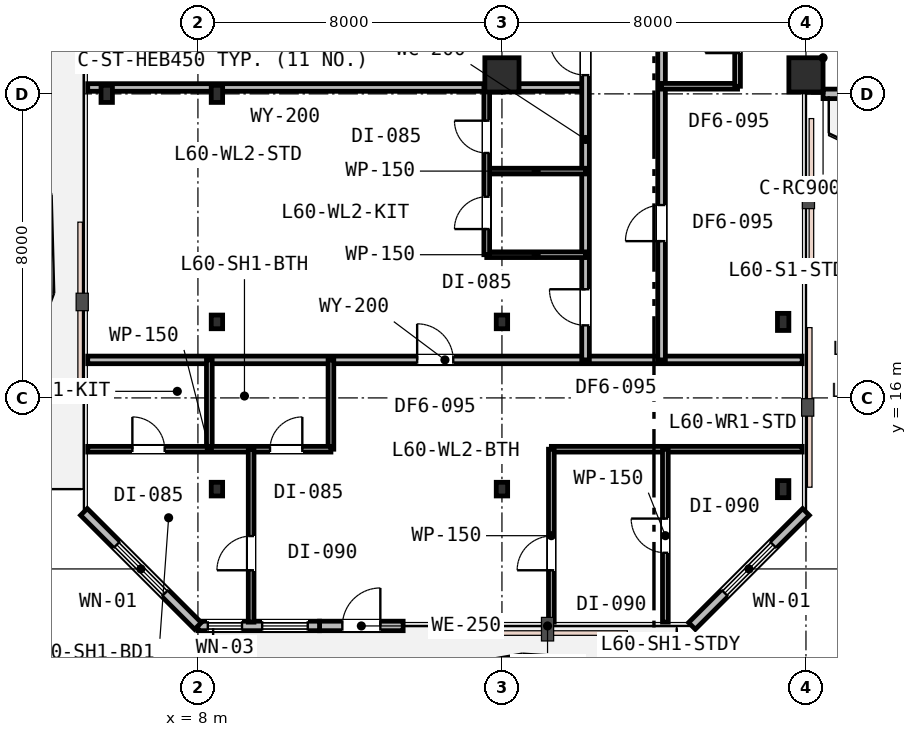
"""IFC4 building model, lengths in metres.
Left out: names, types, materials, properties, quantities, classifications, styles, units other than length and angle.
Written with IfcOpenShell. Run it as: python <this file> out.ifc"""

import sys

from ifc_helpers import new_model, si_unit, direction, frame, frame_2d, origin, origin_2d, place, context, subcontext, project, spatial, rectangle, i_section, extrude, element, fill, save


model = new_model("IFC4")
c1 = context("Model", 3, precision=1e-05, world=origin(), true_north=direction((0.0, 1.0)))
c2 = subcontext(c1, "Body", "Model", "MODEL_VIEW")
j1 = project(units=[si_unit("LENGTHUNIT", "METRE"), si_unit("PLANEANGLEUNIT", "RADIAN")], contexts=[c1])
p1 = place(None, origin())
s1 = spatial("IfcSite", under=j1, at=p1, CompositionType="ELEMENT")
p2 = place(p1, origin())
s2 = spatial("IfcBuilding", under=s1, at=p2, CompositionType="ELEMENT")
p3 = place(p2, frame((0.0, 0.0, 233.6)))
s3 = spatial("IfcBuildingStorey", under=s2, at=p3, CompositionType="ELEMENT", Elevation=233.6)
p4 = place(p3, frame((8.5, 24.0, 0.0), z_axis=(0.0, 0.0, 1.0), x_axis=(1.0, 0.0, 0.0)))
e1 = element("IfcColumn", 1, at=p4, inside=s3, PredefinedType="COLUMN", context=c2, shape_type="SweptSolid", body=[
    extrude(i_section(OverallWidth=0.3, OverallDepth=0.45, WebThickness=0.014, FlangeThickness=0.026, FilletRadius=0.027, at=origin_2d()), origin(), (0.0, 0.0, 1.0), 3.8),
])
for number, where, z_axis, x_axis in (
    (2, (16.0, 24.5, 0.0), (0.0, 0.0, 1.0), (1.0, 0.0, 0.0)),
    (3, (24.0, 24.5, 0.0), (0.0, 0.0, 1.0), (1.0, 0.0, 0.0)),
):
    element("IfcColumn", number, at=place(p3, frame(where, z_axis=z_axis, x_axis=x_axis)), inside=s3, PredefinedType="COLUMN", context=c2, shape_type="SweptSolid", body=[
        extrude(rectangle(XDim=0.9, YDim=0.9, at=origin_2d()), origin(), (0.0, 0.0, 1.0), 3.8),
    ])
for number, where, z_axis, x_axis in (
    (4, (5.6, 24.0, 0.0), (0.0, 0.0, 1.0), (1.0, 0.0, 0.0)),
    (5, (23.4, 13.6, 0.0), (0.0, 0.0, 1.0), (1.0, 0.0, 0.0)),
    (6, (23.4, 18.0, 0.0), (0.0, 0.0, 1.0), (1.0, 0.0, 0.0)),
):
    element("IfcColumn", number, at=place(p3, frame(where, z_axis=z_axis, x_axis=x_axis)), inside=s3, PredefinedType="COLUMN", context=c2, shape_type="SweptSolid", body=[
        extrude(i_section(OverallWidth=0.3, OverallDepth=0.45, WebThickness=0.014, FlangeThickness=0.026, FilletRadius=0.027, at=origin_2d()), origin(), (0.0, 0.0, 1.0), 3.8),
    ])
for number, where, z_axis, x_axis in (
    (7, (8.5, 13.6, 0.0), (0.0, 0.0, 1.0), (1.0, 0.0, 0.0)),
    (8, (16.0, 13.6, 0.0), (0.0, 0.0, 1.0), (1.0, 0.0, 0.0)),
    (9, (8.5, 18.0, 0.0), (0.0, 0.0, 1.0), (1.0, 0.0, 0.0)),
    (10, (16.0, 18.0, 0.0), (0.0, 0.0, 1.0), (1.0, 0.0, 0.0)),
):
    element("IfcColumn", number, at=place(p3, frame(where, z_axis=z_axis, x_axis=x_axis)), inside=s3, PredefinedType="COLUMN", context=c2, shape_type="SweptSolid", body=[
        extrude(i_section(OverallWidth=0.3, OverallDepth=0.36, WebThickness=0.013, FlangeThickness=0.022, FilletRadius=0.027, at=origin_2d()), origin(), (0.0, 0.0, 1.0), 3.8),
    ])
p5 = place(p3, frame((11.2, 10.0, 0.0), z_axis=(0.0, 0.0, 1.0), x_axis=(1.0, 0.0, 0.0)))
e11 = element("IfcWall", 11, at=p5, inside=s3, PredefinedType="STANDARD", context=c2, shape_type="SweptSolid", body=[
    extrude(rectangle(XDim=2.2, YDim=0.25, at=frame_2d((1.1, 0.0))), origin(), (0.0, 0.0, 1.0), 3.53),
])
p6 = place(p5, frame((0.6, 0.0, 0.0)))
e12 = element("IfcOpeningElement", 12, at=p6, cuts=e11, PredefinedType="OPENING", context=c2, shape_type="SweptSolid", body=[
    extrude(rectangle(XDim=1.0, YDim=2.15, at=frame_2d((0.5, 1.075))), frame((0.0, 0.135, 0.0), z_axis=(0.0, -1.0, 0.0), x_axis=(1.0, 0.0, 0.0)), (0.0, 0.0, 1.0), 0.27),
])
p7 = place(p3, frame((8.0, 10.0, 0.0), z_axis=(0.0, 0.0, 1.0), x_axis=(1.0, 0.0, 0.0)))
e13 = element("IfcWall", 13, at=p7, inside=s3, PredefinedType="STANDARD", context=c2, shape_type="SweptSolid", body=[
    extrude(rectangle(XDim=3.2, YDim=0.25, at=frame_2d((1.6, 0.0))), origin(), (0.0, 0.0, 1.0), 3.53),
])
p8 = place(p7, frame((0.26, 0.0, 0.9)))
e14 = element("IfcOpeningElement", 14, at=p8, cuts=e13, PredefinedType="OPENING", context=c2, shape_type="SweptSolid", body=[
    extrude(rectangle(XDim=0.9, YDim=1.55, at=frame_2d((0.45, 0.775))), frame((0.0, 0.135, 0.0), z_axis=(0.0, -1.0, 0.0), x_axis=(1.0, 0.0, 0.0)), (0.0, 0.0, 1.0), 0.27),
])
p9 = place(p7, frame((1.69, 0.0, 0.85)))
e15 = element("IfcOpeningElement", 15, at=p9, cuts=e13, PredefinedType="OPENING", context=c2, shape_type="SweptSolid", body=[
    extrude(rectangle(XDim=1.2, YDim=1.6, at=frame_2d((0.6, 0.8))), frame((0.0, 0.135, 0.0), z_axis=(0.0, -1.0, 0.0), x_axis=(1.0, 0.0, 0.0)), (0.0, 0.0, 1.0), 0.27),
])
p10 = place(p3, frame((21.0, 10.0, 0.0), z_axis=(0.0, 0.0, 1.0), x_axis=(0.707106781187, 0.707106781187, 0.0)))
e16 = element("IfcWall", 16, at=p10, inside=s3, PredefinedType="STANDARD", context=c2, shape_type="SweptSolid", body=[
    extrude(rectangle(XDim=4.243, YDim=0.25, at=frame_2d((2.121, 0.0))), origin(), (0.0, 0.0, 1.0), 3.53),
])
p11 = place(p10, frame((1.221, 0.0, 0.75)))
e17 = element("IfcOpeningElement", 17, at=p11, cuts=e16, PredefinedType="OPENING", context=c2, shape_type="SweptSolid", body=[
    extrude(rectangle(XDim=1.8, YDim=1.85, at=frame_2d((0.9, 0.925))), frame((0.0, 0.135, 0.0), z_axis=(0.0, -1.0, 0.0), x_axis=(1.0, 0.0, 0.0)), (0.0, 0.0, 1.0), 0.27),
])
p12 = place(p3, frame((24.45, 24.0, 0.0), z_axis=(0.0, 0.0, 1.0), x_axis=(1.0, 0.0, 0.0)))
e18 = element("IfcWall", 18, at=p12, inside=s3, PredefinedType="STANDARD", context=c2, shape_type="SweptSolid", body=[
    extrude(rectangle(XDim=0.95, YDim=0.25, at=frame_2d((0.475, 0.0))), origin(), (0.0, 0.0, 1.0), 3.24),
])
p13 = place(p3, frame((5.0, 13.0, 0.0), z_axis=(0.0, 0.0, 1.0), x_axis=(0.707106781187, -0.707106781187, 0.0)))
e19 = element("IfcWall", 19, at=p13, inside=s3, PredefinedType="STANDARD", context=c2, shape_type="SweptSolid", body=[
    extrude(rectangle(XDim=4.243, YDim=0.25, at=frame_2d((2.121, 0.0))), origin(), (0.0, 0.0, 1.0), 3.53),
])
p14 = place(p13, frame((1.221, 0.0, 0.75)))
e20 = element("IfcOpeningElement", 20, at=p14, cuts=e19, PredefinedType="OPENING", context=c2, shape_type="SweptSolid", body=[
    extrude(rectangle(XDim=1.8, YDim=1.85, at=frame_2d((0.9, 0.925))), frame((0.0, 0.135, 0.0), z_axis=(0.0, -1.0, 0.0), x_axis=(1.0, 0.0, 0.0)), (0.0, 0.0, 1.0), 0.27),
])
p15 = place(p3, frame((5.1, 17.0, 0.0), z_axis=(0.0, 0.0, 1.0), x_axis=(1.0, 0.0, 0.0)))
e21 = element("IfcWall", 21, at=p15, inside=s3, PredefinedType="PARTITIONING", context=c2, shape_type="SweptSolid", body=[
    extrude(rectangle(XDim=18.8, YDim=0.2, at=frame_2d((9.4, 0.0))), origin(), (0.0, 0.0, 1.0), 2.92),
])
p16 = place(p15, frame((8.668, 0.0, 0.0)))
e22 = element("IfcOpeningElement", 22, at=p16, cuts=e21, PredefinedType="OPENING", context=c2, shape_type="SweptSolid", body=[
    extrude(rectangle(XDim=0.95, YDim=2.15, at=frame_2d((0.475, 1.075))), frame((0.0, 0.11, 0.0), z_axis=(0.0, -1.0, 0.0), x_axis=(1.0, 0.0, 0.0)), (0.0, 0.0, 1.0), 0.22),
])
p17 = place(p3, frame((5.1, 24.168, 0.0), z_axis=(0.0, 0.0, 1.0), x_axis=(1.0, 0.0, 0.0)))
e23 = element("IfcWall", 23, at=p17, inside=s3, PredefinedType="PARTITIONING", context=c2, shape_type="SweptSolid", body=[
    extrude(rectangle(XDim=13.1, YDim=0.2, at=frame_2d((6.55, 0.0))), origin(), (0.0, 0.0, 1.0), 2.92),
])
p18 = place(p3, frame((18.2, 17.0, 0.0), z_axis=(0.0, 0.0, 1.0), x_axis=(0.0, 1.0, 0.0)))
e24 = element("IfcWall", 24, at=p18, inside=s3, PredefinedType="PARTITIONING", context=c2, shape_type="SweptSolid", body=[
    extrude(rectangle(XDim=11.6, YDim=0.2, at=frame_2d((5.8, 0.0))), origin(), (0.0, 0.0, 1.0), 2.92),
])
p19 = place(p18, frame((7.493, 0.0, 0.0)))
e25 = element("IfcOpeningElement", 25, at=p19, cuts=e24, PredefinedType="OPENING", context=c2, shape_type="SweptSolid", body=[
    extrude(rectangle(XDim=0.95, YDim=2.15, at=frame_2d((0.475, 1.075))), frame((0.0, 0.11, 0.0), z_axis=(0.0, -1.0, 0.0), x_axis=(1.0, 0.0, 0.0)), (0.0, 0.0, 1.0), 0.22),
])
p20 = place(p18, frame((0.909, 0.0, 0.0)))
e26 = element("IfcOpeningElement", 26, at=p20, cuts=e24, PredefinedType="OPENING", context=c2, shape_type="SweptSolid", body=[
    extrude(rectangle(XDim=0.95, YDim=2.15, at=frame_2d((0.475, 1.075))), frame((0.0, 0.11, 0.0), z_axis=(0.0, -1.0, 0.0), x_axis=(1.0, 0.0, 0.0)), (0.0, 0.0, 1.0), 0.22),
])
for number, where, z_axis, x_axis in (
    (27, (15.6, 19.768, 0.0), (0.0, 0.0, 1.0), (1.0, 0.0, 0.0)),
    (28, (15.6, 21.968, 0.0), (0.0, 0.0, 1.0), (1.0, 0.0, 0.0)),
):
    element("IfcWall", number, at=place(p3, frame(where, z_axis=z_axis, x_axis=x_axis)), inside=s3, PredefinedType="PARTITIONING", context=c2, shape_type="SweptSolid", body=[
        extrude(rectangle(XDim=2.6, YDim=0.15, at=frame_2d((1.3, 0.0))), origin(), (0.0, 0.0, 1.0), 2.92),
    ])
p21 = place(p3, frame((15.6, 19.768, 0.0), z_axis=(0.0, 0.0, 1.0), x_axis=(0.0, 1.0, 0.0)))
e29 = element("IfcWall", 29, at=p21, inside=s3, PredefinedType="PARTITIONING", context=c2, shape_type="SweptSolid", body=[
    extrude(rectangle(XDim=4.4, YDim=0.15, at=frame_2d((2.2, 0.0))), origin(), (0.0, 0.0, 1.0), 2.92),
])
p22 = place(p21, frame((0.675, 0.0, 0.0)))
e30 = element("IfcOpeningElement", 30, at=p22, cuts=e29, PredefinedType="OPENING", context=c2, shape_type="SweptSolid", body=[
    extrude(rectangle(XDim=0.85, YDim=2.15, at=frame_2d((0.425, 1.075))), frame((0.0, 0.085, 0.0), z_axis=(0.0, -1.0, 0.0), x_axis=(1.0, 0.0, 0.0)), (0.0, 0.0, 1.0), 0.17),
])
p23 = place(p21, frame((2.677, 0.0, 0.0)))
e31 = element("IfcOpeningElement", 31, at=p23, cuts=e29, PredefinedType="OPENING", context=c2, shape_type="SweptSolid", body=[
    extrude(rectangle(XDim=0.85, YDim=2.15, at=frame_2d((0.425, 1.075))), frame((0.0, 0.085, 0.0), z_axis=(0.0, -1.0, 0.0), x_axis=(1.0, 0.0, 0.0)), (0.0, 0.0, 1.0), 0.17),
])
p24 = place(p3, frame((20.2, 17.0, 0.0), z_axis=(0.0, 0.0, 1.0), x_axis=(0.0, 1.0, 0.0)))
e32 = element("IfcWall", 32, at=p24, inside=s3, PredefinedType="PARTITIONING", context=c2, shape_type="SweptSolid", body=[
    extrude(rectangle(XDim=11.6, YDim=0.2, at=frame_2d((5.8, 0.0))), origin(), (0.0, 0.0, 1.0), 2.92),
])
p25 = place(p24, frame((3.125, 0.0, 0.0)))
e33 = element("IfcOpeningElement", 33, at=p25, cuts=e32, PredefinedType="OPENING", context=c2, shape_type="SweptSolid", body=[
    extrude(rectangle(XDim=0.95, YDim=2.15, at=frame_2d((0.475, 1.075))), frame((0.0, 0.11, 0.0), z_axis=(0.0, -1.0, 0.0), x_axis=(1.0, 0.0, 0.0)), (0.0, 0.0, 1.0), 0.22),
])
p26 = place(p3, frame((20.2, 24.2, 0.0), z_axis=(0.0, 0.0, 1.0), x_axis=(1.0, 0.0, 0.0)))
e34 = element("IfcWall", 34, at=p26, inside=s3, PredefinedType="PARTITIONING", context=c2, shape_type="SweptSolid", body=[
    extrude(rectangle(XDim=2.0, YDim=0.15, at=frame_2d((1.0, 0.0))), origin(), (0.0, 0.0, 1.0), 2.92),
])
p27 = place(p3, frame((22.2, 24.2, 0.0), z_axis=(0.0, 0.0, 1.0), x_axis=(0.0, 1.0, 0.0)))
e35 = element("IfcWall", 35, at=p27, inside=s3, PredefinedType="PARTITIONING", context=c2, shape_type="SweptSolid", body=[
    extrude(rectangle(XDim=4.4, YDim=0.15, at=frame_2d((2.2, 0.0))), origin(), (0.0, 0.0, 1.0), 2.92),
])
p28 = place(p27, frame((0.873, 0.0, 0.0)))
e36 = element("IfcOpeningElement", 36, at=p28, cuts=e35, PredefinedType="OPENING", context=c2, shape_type="SweptSolid", body=[
    extrude(rectangle(XDim=0.85, YDim=2.15, at=frame_2d((0.425, 1.075))), frame((0.0, 0.085, 0.0), z_axis=(0.0, -1.0, 0.0), x_axis=(1.0, 0.0, 0.0)), (0.0, 0.0, 1.0), 0.17),
])
p29 = place(p27, frame((2.875, 0.0, 0.0)))
e37 = element("IfcOpeningElement", 37, at=p29, cuts=e35, PredefinedType="OPENING", context=c2, shape_type="SweptSolid", body=[
    extrude(rectangle(XDim=0.85, YDim=2.15, at=frame_2d((0.425, 1.075))), frame((0.0, 0.085, 0.0), z_axis=(0.0, -1.0, 0.0), x_axis=(1.0, 0.0, 0.0)), (0.0, 0.0, 1.0), 0.17),
])
p30 = place(p3, frame((11.5, 14.65, 0.0), z_axis=(0.0, 0.0, 1.0), x_axis=(0.0, 1.0, 0.0)))
e38 = element("IfcWall", 38, at=p30, inside=s3, PredefinedType="PARTITIONING", context=c2, shape_type="SweptSolid", body=[
    extrude(rectangle(XDim=2.35, YDim=0.15, at=frame_2d((1.175, 0.0))), origin(), (0.0, 0.0, 1.0), 3.22),
])
p31 = place(p3, frame((8.3, 14.65, 0.0), z_axis=(0.0, 0.0, 1.0), x_axis=(0.0, 1.0, 0.0)))
e39 = element("IfcWall", 39, at=p31, inside=s3, PredefinedType="PARTITIONING", context=c2, shape_type="SweptSolid", body=[
    extrude(rectangle(XDim=2.35, YDim=0.15, at=frame_2d((1.175, 0.0))), origin(), (0.0, 0.0, 1.0), 2.92),
])
p32 = place(p3, frame((5.1, 14.65, 0.0), z_axis=(0.0, 0.0, 1.0), x_axis=(1.0, 0.0, 0.0)))
e40 = element("IfcWall", 40, at=p32, inside=s3, PredefinedType="PARTITIONING", context=c2, shape_type="SweptSolid", body=[
    extrude(rectangle(XDim=6.4, YDim=0.15, at=frame_2d((3.2, 0.0))), origin(), (0.0, 0.0, 1.0), 2.92),
])
p33 = place(p32, frame((1.175, 0.0, 0.0)))
e41 = element("IfcOpeningElement", 41, at=p33, cuts=e40, PredefinedType="OPENING", context=c2, shape_type="SweptSolid", body=[
    extrude(rectangle(XDim=0.85, YDim=2.15, at=frame_2d((0.425, 1.075))), frame((0.0, 0.085, 0.0), z_axis=(0.0, -1.0, 0.0), x_axis=(1.0, 0.0, 0.0)), (0.0, 0.0, 1.0), 0.17),
])
p34 = place(p32, frame((4.797, 0.0, 0.0)))
e42 = element("IfcOpeningElement", 42, at=p34, cuts=e40, PredefinedType="OPENING", context=c2, shape_type="SweptSolid", body=[
    extrude(rectangle(XDim=0.85, YDim=2.15, at=frame_2d((0.425, 1.075))), frame((0.0, 0.085, 0.0), z_axis=(0.0, -1.0, 0.0), x_axis=(1.0, 0.0, 0.0)), (0.0, 0.0, 1.0), 0.17),
])
p35 = place(p3, frame((17.3, 14.65, 0.0), z_axis=(0.0, 0.0, 1.0), x_axis=(1.0, 0.0, 0.0)))
e43 = element("IfcWall", 43, at=p35, inside=s3, PredefinedType="PARTITIONING", context=c2, shape_type="SweptSolid", body=[
    extrude(rectangle(XDim=6.6, YDim=0.15, at=frame_2d((3.3, 0.0))), origin(), (0.0, 0.0, 1.0), 3.22),
])
p36 = place(p3, frame((9.4, 10.1, 0.0), z_axis=(0.0, 0.0, 1.0), x_axis=(0.0, 1.0, 0.0)))
e44 = element("IfcWall", 44, at=p36, inside=s3, PredefinedType="PARTITIONING", context=c2, shape_type="SweptSolid", body=[
    extrude(rectangle(XDim=4.55, YDim=0.15, at=frame_2d((2.275, 0.0))), origin(), (0.0, 0.0, 1.0), 2.92),
])
p37 = place(p36, frame((1.365, 0.0, 0.0)))
e45 = element("IfcOpeningElement", 45, at=p37, cuts=e44, PredefinedType="OPENING", context=c2, shape_type="SweptSolid", body=[
    extrude(rectangle(XDim=0.9, YDim=2.15, at=frame_2d((0.45, 1.075))), frame((0.0, 0.085, 0.0), z_axis=(0.0, -1.0, 0.0), x_axis=(1.0, 0.0, 0.0)), (0.0, 0.0, 1.0), 0.17),
])
p38 = place(p3, frame((20.3, 10.1, 0.0), z_axis=(0.0, 0.0, 1.0), x_axis=(0.0, 1.0, 0.0)))
e46 = element("IfcWall", 46, at=p38, inside=s3, PredefinedType="PARTITIONING", context=c2, shape_type="SweptSolid", body=[
    extrude(rectangle(XDim=4.55, YDim=0.15, at=frame_2d((2.275, 0.0))), origin(), (0.0, 0.0, 1.0), 2.92),
])
p39 = place(p38, frame((1.825, 0.0, 0.0)))
e47 = element("IfcOpeningElement", 47, at=p39, cuts=e46, PredefinedType="OPENING", context=c2, shape_type="SweptSolid", body=[
    extrude(rectangle(XDim=0.9, YDim=2.15, at=frame_2d((0.45, 1.075))), frame((0.0, 0.085, 0.0), z_axis=(0.0, -1.0, 0.0), x_axis=(1.0, 0.0, 0.0)), (0.0, 0.0, 1.0), 0.17),
])
p40 = place(p3, frame((17.3, 10.1, 0.0), z_axis=(0.0, 0.0, 1.0), x_axis=(0.0, 1.0, 0.0)))
e48 = element("IfcWall", 48, at=p40, inside=s3, PredefinedType="PARTITIONING", context=c2, shape_type="SweptSolid", body=[
    extrude(rectangle(XDim=4.55, YDim=0.15, at=frame_2d((2.275, 0.0))), origin(), (0.0, 0.0, 1.0), 2.92),
])
p41 = place(p40, frame((1.365, 0.0, 0.0)))
e49 = element("IfcOpeningElement", 49, at=p41, cuts=e48, PredefinedType="OPENING", context=c2, shape_type="SweptSolid", body=[
    extrude(rectangle(XDim=0.9, YDim=2.15, at=frame_2d((0.45, 1.075))), frame((0.0, 0.085, 0.0), z_axis=(0.0, -1.0, 0.0), x_axis=(1.0, 0.0, 0.0)), (0.0, 0.0, 1.0), 0.17),
])
p42 = place(p6, origin())
e50 = element("IfcDoor", 50, at=p42, inside=s3, OperationType="SINGLE_SWING_RIGHT", PredefinedType="DOOR", context=c2, shape_type="SweptSolid", body=[
    extrude(rectangle(XDim=1.0, YDim=2.15, at=frame_2d((0.5, 1.075))), frame((0.0, 0.025, 0.0), z_axis=(0.0, -1.0, 0.0), x_axis=(1.0, 0.0, 0.0)), (0.0, 0.0, 1.0), 0.05),
])
fill(e12, e50)
p43 = place(p8, origin())
e51 = element("IfcWindow", 51, at=p43, inside=s3, PartitioningType="SINGLE_PANEL", PredefinedType="WINDOW", context=c2, shape_type="SweptSolid", body=[
    extrude(rectangle(XDim=0.9, YDim=1.55, at=frame_2d((0.45, 0.775))), frame((0.0, 0.03, 0.0), z_axis=(0.0, -1.0, 0.0), x_axis=(1.0, 0.0, 0.0)), (0.0, 0.0, 1.0), 0.06),
])
fill(e14, e51)
p44 = place(p9, origin())
e52 = element("IfcWindow", 52, at=p44, inside=s3, PartitioningType="SINGLE_PANEL", PredefinedType="WINDOW", context=c2, shape_type="SweptSolid", body=[
    extrude(rectangle(XDim=1.2, YDim=1.6, at=frame_2d((0.6, 0.8))), frame((0.0, 0.03, 0.0), z_axis=(0.0, -1.0, 0.0), x_axis=(1.0, 0.0, 0.0)), (0.0, 0.0, 1.0), 0.06),
])
fill(e15, e52)
p45 = place(p11, origin())
e53 = element("IfcWindow", 53, at=p45, inside=s3, PartitioningType="SINGLE_PANEL", PredefinedType="WINDOW", context=c2, shape_type="SweptSolid", body=[
    extrude(rectangle(XDim=1.8, YDim=1.85, at=frame_2d((0.9, 0.925))), frame((0.0, 0.03, 0.0), z_axis=(0.0, -1.0, 0.0), x_axis=(1.0, 0.0, 0.0)), (0.0, 0.0, 1.0), 0.06),
])
fill(e17, e53)
p46 = place(p14, origin())
e54 = element("IfcWindow", 54, at=p46, inside=s3, PartitioningType="SINGLE_PANEL", PredefinedType="WINDOW", context=c2, shape_type="SweptSolid", body=[
    extrude(rectangle(XDim=1.8, YDim=1.85, at=frame_2d((0.9, 0.925))), frame((0.0, 0.03, 0.0), z_axis=(0.0, -1.0, 0.0), x_axis=(1.0, 0.0, 0.0)), (0.0, 0.0, 1.0), 0.06),
])
fill(e20, e54)
p47 = place(p19, origin())
e55 = element("IfcDoor", 55, at=p47, inside=s3, OperationType="SINGLE_SWING_RIGHT", PredefinedType="DOOR", context=c2, shape_type="SweptSolid", body=[
    extrude(rectangle(XDim=0.95, YDim=2.15, at=frame_2d((0.475, 1.075))), frame((0.0, 0.025, 0.0), z_axis=(0.0, -1.0, 0.0), x_axis=(1.0, 0.0, 0.0)), (0.0, 0.0, 1.0), 0.05),
])
fill(e25, e55)
p48 = place(p20, origin())
e56 = element("IfcDoor", 56, at=p48, inside=s3, OperationType="SINGLE_SWING_RIGHT", PredefinedType="DOOR", context=c2, shape_type="SweptSolid", body=[
    extrude(rectangle(XDim=0.95, YDim=2.15, at=frame_2d((0.475, 1.075))), frame((0.0, 0.025, 0.0), z_axis=(0.0, -1.0, 0.0), x_axis=(1.0, 0.0, 0.0)), (0.0, 0.0, 1.0), 0.05),
])
fill(e26, e56)
p49 = place(p22, origin())
e57 = element("IfcDoor", 57, at=p49, inside=s3, OperationType="SINGLE_SWING_LEFT", PredefinedType="DOOR", context=c2, shape_type="SweptSolid", body=[
    extrude(rectangle(XDim=0.85, YDim=2.15, at=frame_2d((0.425, 1.075))), frame((0.0, 0.025, 0.0), z_axis=(0.0, -1.0, 0.0), x_axis=(1.0, 0.0, 0.0)), (0.0, 0.0, 1.0), 0.05),
])
fill(e30, e57)
p50 = place(p23, origin())
e58 = element("IfcDoor", 58, at=p50, inside=s3, OperationType="SINGLE_SWING_RIGHT", PredefinedType="DOOR", context=c2, shape_type="SweptSolid", body=[
    extrude(rectangle(XDim=0.85, YDim=2.15, at=frame_2d((0.425, 1.075))), frame((0.0, 0.025, 0.0), z_axis=(0.0, -1.0, 0.0), x_axis=(1.0, 0.0, 0.0)), (0.0, 0.0, 1.0), 0.05),
])
fill(e31, e58)
p51 = place(p25, origin())
e59 = element("IfcDoor", 59, at=p51, inside=s3, OperationType="SINGLE_SWING_LEFT", PredefinedType="DOOR", context=c2, shape_type="SweptSolid", body=[
    extrude(rectangle(XDim=0.95, YDim=2.15, at=frame_2d((0.475, 1.075))), frame((0.0, 0.025, 0.0), z_axis=(0.0, -1.0, 0.0), x_axis=(1.0, 0.0, 0.0)), (0.0, 0.0, 1.0), 0.05),
])
fill(e33, e59)
p52 = place(p28, origin())
e60 = element("IfcDoor", 60, at=p52, inside=s3, OperationType="SINGLE_SWING_LEFT", PredefinedType="DOOR", context=c2, shape_type="SweptSolid", body=[
    extrude(rectangle(XDim=0.85, YDim=2.15, at=frame_2d((0.425, 1.075))), frame((0.0, 0.025, 0.0), z_axis=(0.0, -1.0, 0.0), x_axis=(1.0, 0.0, 0.0)), (0.0, 0.0, 1.0), 0.05),
])
fill(e36, e60)
p53 = place(p16, origin())
e61 = element("IfcDoor", 61, at=p53, inside=s3, OperationType="SINGLE_SWING_LEFT", PredefinedType="DOOR", context=c2, shape_type="SweptSolid", body=[
    extrude(rectangle(XDim=0.95, YDim=2.15, at=frame_2d((0.475, 1.075))), frame((0.0, 0.025, 0.0), z_axis=(0.0, -1.0, 0.0), x_axis=(1.0, 0.0, 0.0)), (0.0, 0.0, 1.0), 0.05),
])
fill(e22, e61)
p54 = place(p33, origin())
e62 = element("IfcDoor", 62, at=p54, inside=s3, OperationType="SINGLE_SWING_LEFT", PredefinedType="DOOR", context=c2, shape_type="SweptSolid", body=[
    extrude(rectangle(XDim=0.85, YDim=2.15, at=frame_2d((0.425, 1.075))), frame((0.0, 0.025, 0.0), z_axis=(0.0, -1.0, 0.0), x_axis=(1.0, 0.0, 0.0)), (0.0, 0.0, 1.0), 0.05),
])
fill(e41, e62)
p55 = place(p34, origin())
e63 = element("IfcDoor", 63, at=p55, inside=s3, OperationType="SINGLE_SWING_RIGHT", PredefinedType="DOOR", context=c2, shape_type="SweptSolid", body=[
    extrude(rectangle(XDim=0.85, YDim=2.15, at=frame_2d((0.425, 1.075))), frame((0.0, 0.025, 0.0), z_axis=(0.0, -1.0, 0.0), x_axis=(1.0, 0.0, 0.0)), (0.0, 0.0, 1.0), 0.05),
])
fill(e42, e63)
p56 = place(p37, origin())
e64 = element("IfcDoor", 64, at=p56, inside=s3, OperationType="SINGLE_SWING_LEFT", PredefinedType="DOOR", context=c2, shape_type="SweptSolid", body=[
    extrude(rectangle(XDim=0.9, YDim=2.15, at=frame_2d((0.45, 1.075))), frame((0.0, 0.025, 0.0), z_axis=(0.0, -1.0, 0.0), x_axis=(1.0, 0.0, 0.0)), (0.0, 0.0, 1.0), 0.05),
])
fill(e45, e64)
p57 = place(p39, origin())
e65 = element("IfcDoor", 65, at=p57, inside=s3, OperationType="SINGLE_SWING_RIGHT", PredefinedType="DOOR", context=c2, shape_type="SweptSolid", body=[
    extrude(rectangle(XDim=0.9, YDim=2.15, at=frame_2d((0.45, 1.075))), frame((0.0, 0.025, 0.0), z_axis=(0.0, -1.0, 0.0), x_axis=(1.0, 0.0, 0.0)), (0.0, 0.0, 1.0), 0.05),
])
fill(e47, e65)
p58 = place(p41, origin())
e66 = element("IfcDoor", 66, at=p58, inside=s3, OperationType="SINGLE_SWING_LEFT", PredefinedType="DOOR", context=c2, shape_type="SweptSolid", body=[
    extrude(rectangle(XDim=0.9, YDim=2.15, at=frame_2d((0.45, 1.075))), frame((0.0, 0.025, 0.0), z_axis=(0.0, -1.0, 0.0), x_axis=(1.0, 0.0, 0.0)), (0.0, 0.0, 1.0), 0.05),
])
fill(e49, e66)
save(model, sys.argv[1])
